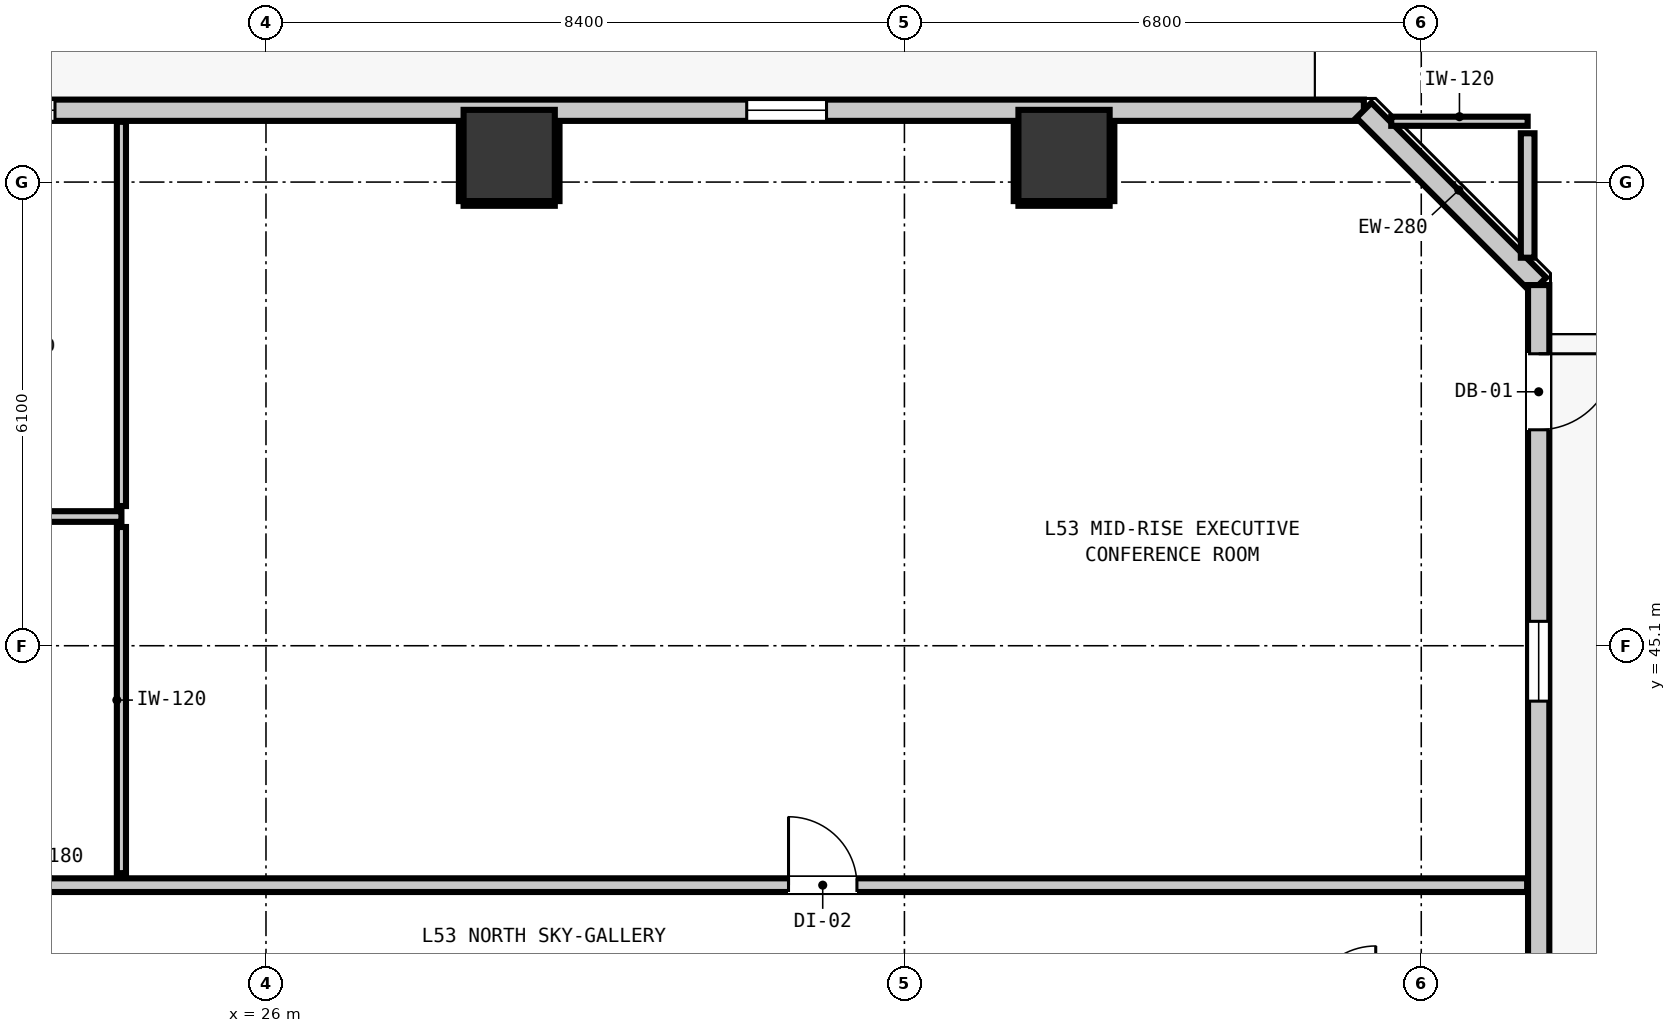
"""IFC4 building model, lengths in metres.
Left out: names, types, materials, properties, quantities, classifications, styles, units other than length and angle.
Written with IfcOpenShell. Run it as: python <this file> out.ifc"""

import sys

from ifc_helpers import new_model, si_unit, direction, frame, frame_2d, origin, origin_2d, place, context, subcontext, project, spatial, rectangle, extrude, element, fill, save


model = new_model("IFC4")
c1 = context("Model", 3, precision=1e-05, world=origin(), true_north=direction((0.0, 1.0)))
c2 = subcontext(c1, "Body", "Model", "MODEL_VIEW")
j1 = project(units=[si_unit("LENGTHUNIT", "METRE"), si_unit("PLANEANGLEUNIT", "RADIAN")], contexts=[c1])
p1 = place(None, origin())
s1 = spatial("IfcSite", under=j1, at=p1, CompositionType="ELEMENT")
p2 = place(p1, origin())
s2 = spatial("IfcBuilding", under=s1, at=p2, CompositionType="ELEMENT")
p3 = place(p2, frame((0.0, 0.0, 183.52)))
s3 = spatial("IfcBuildingStorey", under=s2, at=p3, CompositionType="ELEMENT", Elevation=183.52)
for number, where, z_axis, x_axis in (
    (1, (29.2, 51.55, 0.0), (0.0, 0.0, 1.0), (1.0, 0.0, 0.0)),
    (2, (36.5, 51.55, 0.0), (0.0, 0.0, 1.0), (1.0, 0.0, 0.0)),
):
    element("IfcColumn", number, at=place(p3, frame(where, z_axis=z_axis, x_axis=x_axis)), inside=s3, PredefinedType="COLUMN", context=c2, shape_type="SweptSolid", body=[
        extrude(rectangle(XDim=1.2, YDim=1.2, at=origin_2d()), origin(), (0.0, 0.0, 1.0), 3.32),
    ])
p4 = place(p3, frame((5.355, 52.145, 0.0), z_axis=(0.0, 0.0, 1.0), x_axis=(1.0, 0.0, 0.0)))
e3 = element("IfcWall", 3, at=p4, inside=s3, PredefinedType="STANDARD", context=c2, shape_type="SweptSolid", body=[
    extrude(rectangle(XDim=35.09, YDim=0.28, at=frame_2d((17.545, 0.0))), origin(), (0.0, 0.0, 1.0), 3.08),
])
p5 = place(p4, frame((0.904, 0.0, 0.0)))
e4 = element("IfcOpeningElement", 4, at=p5, cuts=e3, PredefinedType="OPENING", context=c2, shape_type="SweptSolid", body=[
    extrude(rectangle(XDim=1.0, YDim=2.15, at=frame_2d((0.5, 1.075))), frame((0.0, 0.15, 0.0), z_axis=(0.0, -1.0, 0.0), x_axis=(1.0, 0.0, 0.0)), (0.0, 0.0, 1.0), 0.3),
])
p6 = place(p4, frame((4.492, 0.0, 0.85)))
e5 = element("IfcOpeningElement", 5, at=p6, cuts=e3, PredefinedType="OPENING", context=c2, shape_type="SweptSolid", body=[
    extrude(rectangle(XDim=1.05, YDim=1.65, at=frame_2d((0.525, 0.825))), frame((0.0, 0.15, 0.0), z_axis=(0.0, -1.0, 0.0), x_axis=(1.0, 0.0, 0.0)), (0.0, 0.0, 1.0), 0.3),
])
p7 = place(p4, frame((16.819, 0.0, 0.85)))
e6 = element("IfcOpeningElement", 6, at=p7, cuts=e3, PredefinedType="OPENING", context=c2, shape_type="SweptSolid", body=[
    extrude(rectangle(XDim=1.05, YDim=1.65, at=frame_2d((0.525, 0.825))), frame((0.0, 0.15, 0.0), z_axis=(0.0, -1.0, 0.0), x_axis=(1.0, 0.0, 0.0)), (0.0, 0.0, 1.0), 0.3),
])
p8 = place(p4, frame((26.97, 0.0, 0.85)))
e7 = element("IfcOpeningElement", 7, at=p8, cuts=e3, PredefinedType="OPENING", context=c2, shape_type="SweptSolid", body=[
    extrude(rectangle(XDim=1.05, YDim=1.65, at=frame_2d((0.525, 0.825))), frame((0.0, 0.15, 0.0), z_axis=(0.0, -1.0, 0.0), x_axis=(1.0, 0.0, 0.0)), (0.0, 0.0, 1.0), 0.3),
])
p9 = place(p3, frame((40.445, 52.145, 0.0), z_axis=(0.0, 0.0, 1.0), x_axis=(0.707106781187, -0.707106781187, 0.0)))
e8 = element("IfcWall", 8, at=p9, inside=s3, PredefinedType="STANDARD", context=c2, shape_type="SweptSolid", body=[
    extrude(rectangle(XDim=3.253, YDim=0.28, at=frame_2d((1.626, 0.0))), origin(), (0.0, 0.0, 1.0), 3.08),
])
p10 = place(p3, frame((42.745, 49.845, 0.0), z_axis=(0.0, 0.0, 1.0), x_axis=(0.0, -1.0, 0.0)))
e9 = element("IfcWall", 9, at=p10, inside=s3, PredefinedType="STANDARD", context=c2, shape_type="SweptSolid", body=[
    extrude(rectangle(XDim=32.29, YDim=0.28, at=frame_2d((16.145, 0.0))), origin(), (0.0, 0.0, 1.0), 3.08),
])
p11 = place(p10, frame((0.904, 0.0, 0.0)))
e10 = element("IfcOpeningElement", 10, at=p11, cuts=e9, PredefinedType="OPENING", context=c2, shape_type="SweptSolid", body=[
    extrude(rectangle(XDim=1.0, YDim=2.15, at=frame_2d((0.5, 1.075))), frame((0.0, 0.15, 0.0), z_axis=(0.0, -1.0, 0.0), x_axis=(1.0, 0.0, 0.0)), (0.0, 0.0, 1.0), 0.3),
])
p12 = place(p10, frame((30.822, 0.0, 0.85)))
e11 = element("IfcOpeningElement", 11, at=p12, cuts=e9, PredefinedType="OPENING", context=c2, shape_type="SweptSolid", body=[
    extrude(rectangle(XDim=1.05, YDim=1.65, at=frame_2d((0.525, 0.825))), frame((0.0, 0.15, 0.0), z_axis=(0.0, -1.0, 0.0), x_axis=(1.0, 0.0, 0.0)), (0.0, 0.0, 1.0), 0.3),
])
p13 = place(p10, frame((4.424, 0.0, 0.85)))
e12 = element("IfcOpeningElement", 12, at=p13, cuts=e9, PredefinedType="OPENING", context=c2, shape_type="SweptSolid", body=[
    extrude(rectangle(XDim=1.05, YDim=1.65, at=frame_2d((0.525, 0.825))), frame((0.0, 0.15, 0.0), z_axis=(0.0, -1.0, 0.0), x_axis=(1.0, 0.0, 0.0)), (0.0, 0.0, 1.0), 0.3),
])
p14 = place(p10, frame((24.724, 0.0, 0.85)))
e13 = element("IfcOpeningElement", 13, at=p14, cuts=e9, PredefinedType="OPENING", context=c2, shape_type="SweptSolid", body=[
    extrude(rectangle(XDim=1.05, YDim=1.65, at=frame_2d((0.525, 0.825))), frame((0.0, 0.15, 0.0), z_axis=(0.0, -1.0, 0.0), x_axis=(1.0, 0.0, 0.0)), (0.0, 0.0, 1.0), 0.3),
])
p15 = place(p3, frame((3.207, 41.95, 0.0), z_axis=(0.0, 0.0, 1.0), x_axis=(1.0, 0.0, 0.0)))
e14 = element("IfcWall", 14, at=p15, inside=s3, PredefinedType="PARTITIONING", context=c2, shape_type="SweptSolid", body=[
    extrude(rectangle(XDim=39.386, YDim=0.18, at=frame_2d((19.693, 0.0))), origin(), (0.0, 0.0, 1.0), 3.08),
])
p16 = place(p15, frame((9.199, 0.0, 0.0)))
e15 = element("IfcOpeningElement", 15, at=p16, cuts=e14, PredefinedType="OPENING", context=c2, shape_type="SweptSolid", body=[
    extrude(rectangle(XDim=1.0, YDim=2.15, at=frame_2d((0.5, 1.075))), frame((0.0, 0.1, 0.0), z_axis=(0.0, -1.0, 0.0), x_axis=(1.0, 0.0, 0.0)), (0.0, 0.0, 1.0), 0.2),
])
p17 = place(p15, frame((29.668, 0.0, 0.0)))
e16 = element("IfcOpeningElement", 16, at=p17, cuts=e14, PredefinedType="OPENING", context=c2, shape_type="SweptSolid", body=[
    extrude(rectangle(XDim=0.9, YDim=2.1, at=frame_2d((0.45, 1.05))), frame((0.0, 0.1, 0.0), z_axis=(0.0, -1.0, 0.0), x_axis=(1.0, 0.0, 0.0)), (0.0, 0.0, 1.0), 0.2),
])
p18 = place(p3, frame((3.207, 46.8, 0.0), z_axis=(0.0, 0.0, 1.0), x_axis=(1.0, 0.0, 0.0)))
e17 = element("IfcWall", 17, at=p18, inside=s3, PredefinedType="PARTITIONING", context=c2, shape_type="SweptSolid", body=[
    extrude(rectangle(XDim=20.891, YDim=0.14, at=frame_2d((10.445, 0.0))), origin(), (0.0, 0.0, 1.0), 3.08),
])
p19 = place(p18, frame((9.249, 0.0, 0.0)))
e18 = element("IfcOpeningElement", 18, at=p19, cuts=e17, PredefinedType="OPENING", context=c2, shape_type="SweptSolid", body=[
    extrude(rectangle(XDim=0.9, YDim=2.1, at=frame_2d((0.45, 1.05))), frame((0.0, 0.08, 0.0), z_axis=(0.0, -1.0, 0.0), x_axis=(1.0, 0.0, 0.0)), (0.0, 0.0, 1.0), 0.16),
])
p20 = place(p3, frame((40.805, 52.0, 0.0), z_axis=(0.0, 0.0, 1.0), x_axis=(1.0, 0.0, 0.0)))
e19 = element("IfcWall", 19, at=p20, inside=s3, PredefinedType="PARTITIONING", context=c2, shape_type="SweptSolid", body=[
    extrude(rectangle(XDim=1.795, YDim=0.12, at=frame_2d((0.897, 0.0))), origin(), (0.0, 0.0, 1.0), 3.08),
])
p21 = place(p3, frame((42.6, 50.205, 0.0), z_axis=(0.0, 0.0, 1.0), x_axis=(0.0, 1.0, 0.0)))
e20 = element("IfcWall", 20, at=p21, inside=s3, PredefinedType="PARTITIONING", context=c2, shape_type="SweptSolid", body=[
    extrude(rectangle(XDim=1.637, YDim=0.18, at=frame_2d((0.818, 0.0))), origin(), (0.0, 0.0, 1.0), 3.08),
])
p22 = place(p3, frame((24.098, 42.108, 0.0), z_axis=(0.0, 0.0, 1.0), x_axis=(0.0, 1.0, 0.0)))
e21 = element("IfcWall", 21, at=p22, inside=s3, PredefinedType="PARTITIONING", context=c2, shape_type="SweptSolid", body=[
    extrude(rectangle(XDim=4.554, YDim=0.12, at=frame_2d((2.277, 0.0))), origin(), (0.0, 0.0, 1.0), 3.08),
])
p23 = place(p3, frame((24.098, 46.938, 0.0), z_axis=(0.0, 0.0, 1.0), x_axis=(0.0, 1.0, 0.0)))
e22 = element("IfcWall", 22, at=p23, inside=s3, PredefinedType="PARTITIONING", context=c2, shape_type="SweptSolid", body=[
    extrude(rectangle(XDim=5.055, YDim=0.12, at=frame_2d((2.527, 0.0))), origin(), (0.0, 0.0, 1.0), 3.08),
])
p24 = place(p3, frame((28.6, 50.918, 0.0), z_axis=(0.0, 0.0, 1.0), x_axis=(1.0, 0.0, 0.0)))
e23 = element("IfcWall", 23, at=p24, inside=s3, PredefinedType="PARTITIONING", context=c2, shape_type="SweptSolid", body=[
    extrude(rectangle(XDim=1.2, YDim=0.06, at=frame_2d((0.6, 0.0))), origin(), (0.0, 0.0, 1.0), 1.45),
])
for number, where, z_axis, x_axis in (
    (24, (28.568, 50.95, 0.0), (0.0, 0.0, 1.0), (0.0, 1.0, 0.0)),
    (25, (29.832, 50.95, 0.0), (0.0, 0.0, 1.0), (0.0, 1.0, 0.0)),
):
    element("IfcWall", number, at=place(p3, frame(where, z_axis=z_axis, x_axis=x_axis)), inside=s3, PredefinedType="PARTITIONING", context=c2, shape_type="SweptSolid", body=[
        extrude(rectangle(XDim=1.04, YDim=0.06, at=frame_2d((0.52, 0.0))), origin(), (0.0, 0.0, 1.0), 1.45),
    ])
p25 = place(p3, frame((35.9, 50.918, 0.0), z_axis=(0.0, 0.0, 1.0), x_axis=(1.0, 0.0, 0.0)))
e26 = element("IfcWall", 26, at=p25, inside=s3, PredefinedType="PARTITIONING", context=c2, shape_type="SweptSolid", body=[
    extrude(rectangle(XDim=1.2, YDim=0.06, at=frame_2d((0.6, 0.0))), origin(), (0.0, 0.0, 1.0), 1.45),
])
for number, where, z_axis, x_axis in (
    (27, (35.868, 50.95, 0.0), (0.0, 0.0, 1.0), (0.0, 1.0, 0.0)),
    (28, (37.132, 50.95, 0.0), (0.0, 0.0, 1.0), (0.0, 1.0, 0.0)),
):
    element("IfcWall", number, at=place(p3, frame(where, z_axis=z_axis, x_axis=x_axis)), inside=s3, PredefinedType="PARTITIONING", context=c2, shape_type="SweptSolid", body=[
        extrude(rectangle(XDim=1.04, YDim=0.06, at=frame_2d((0.52, 0.0))), origin(), (0.0, 0.0, 1.0), 1.45),
    ])
p26 = place(p11, origin())
e29 = element("IfcDoor", 29, at=p26, inside=s3, OperationType="SINGLE_SWING_LEFT", PredefinedType="DOOR", context=c2, shape_type="SweptSolid", body=[
    extrude(rectangle(XDim=1.0, YDim=2.15, at=frame_2d((0.5, 1.075))), frame((0.0, 0.025, 0.0), z_axis=(0.0, -1.0, 0.0), x_axis=(1.0, 0.0, 0.0)), (0.0, 0.0, 1.0), 0.05),
])
fill(e10, e29)
p27 = place(p7, origin())
e30 = element("IfcWindow", 30, at=p27, inside=s3, PartitioningType="SINGLE_PANEL", PredefinedType="WINDOW", context=c2, shape_type="SweptSolid", body=[
    extrude(rectangle(XDim=1.05, YDim=1.65, at=frame_2d((0.525, 0.825))), frame((0.0, 0.03, 0.0), z_axis=(0.0, -1.0, 0.0), x_axis=(1.0, 0.0, 0.0)), (0.0, 0.0, 1.0), 0.06),
])
fill(e6, e30)
p28 = place(p8, origin())
e31 = element("IfcWindow", 31, at=p28, inside=s3, PartitioningType="SINGLE_PANEL", PredefinedType="WINDOW", context=c2, shape_type="SweptSolid", body=[
    extrude(rectangle(XDim=1.05, YDim=1.65, at=frame_2d((0.525, 0.825))), frame((0.0, 0.03, 0.0), z_axis=(0.0, -1.0, 0.0), x_axis=(1.0, 0.0, 0.0)), (0.0, 0.0, 1.0), 0.06),
])
fill(e7, e31)
p29 = place(p13, origin())
e32 = element("IfcWindow", 32, at=p29, inside=s3, PartitioningType="SINGLE_PANEL", PredefinedType="WINDOW", context=c2, shape_type="SweptSolid", body=[
    extrude(rectangle(XDim=1.05, YDim=1.65, at=frame_2d((0.525, 0.825))), frame((0.0, 0.03, 0.0), z_axis=(0.0, -1.0, 0.0), x_axis=(1.0, 0.0, 0.0)), (0.0, 0.0, 1.0), 0.06),
])
fill(e12, e32)
p30 = place(p17, origin())
e33 = element("IfcDoor", 33, at=p30, inside=s3, OperationType="SINGLE_SWING_LEFT", PredefinedType="DOOR", context=c2, shape_type="SweptSolid", body=[
    extrude(rectangle(XDim=0.9, YDim=2.1, at=frame_2d((0.45, 1.05))), frame((0.0, 0.025, 0.0), z_axis=(0.0, -1.0, 0.0), x_axis=(1.0, 0.0, 0.0)), (0.0, 0.0, 1.0), 0.05),
])
fill(e16, e33)
save(model, sys.argv[1])
